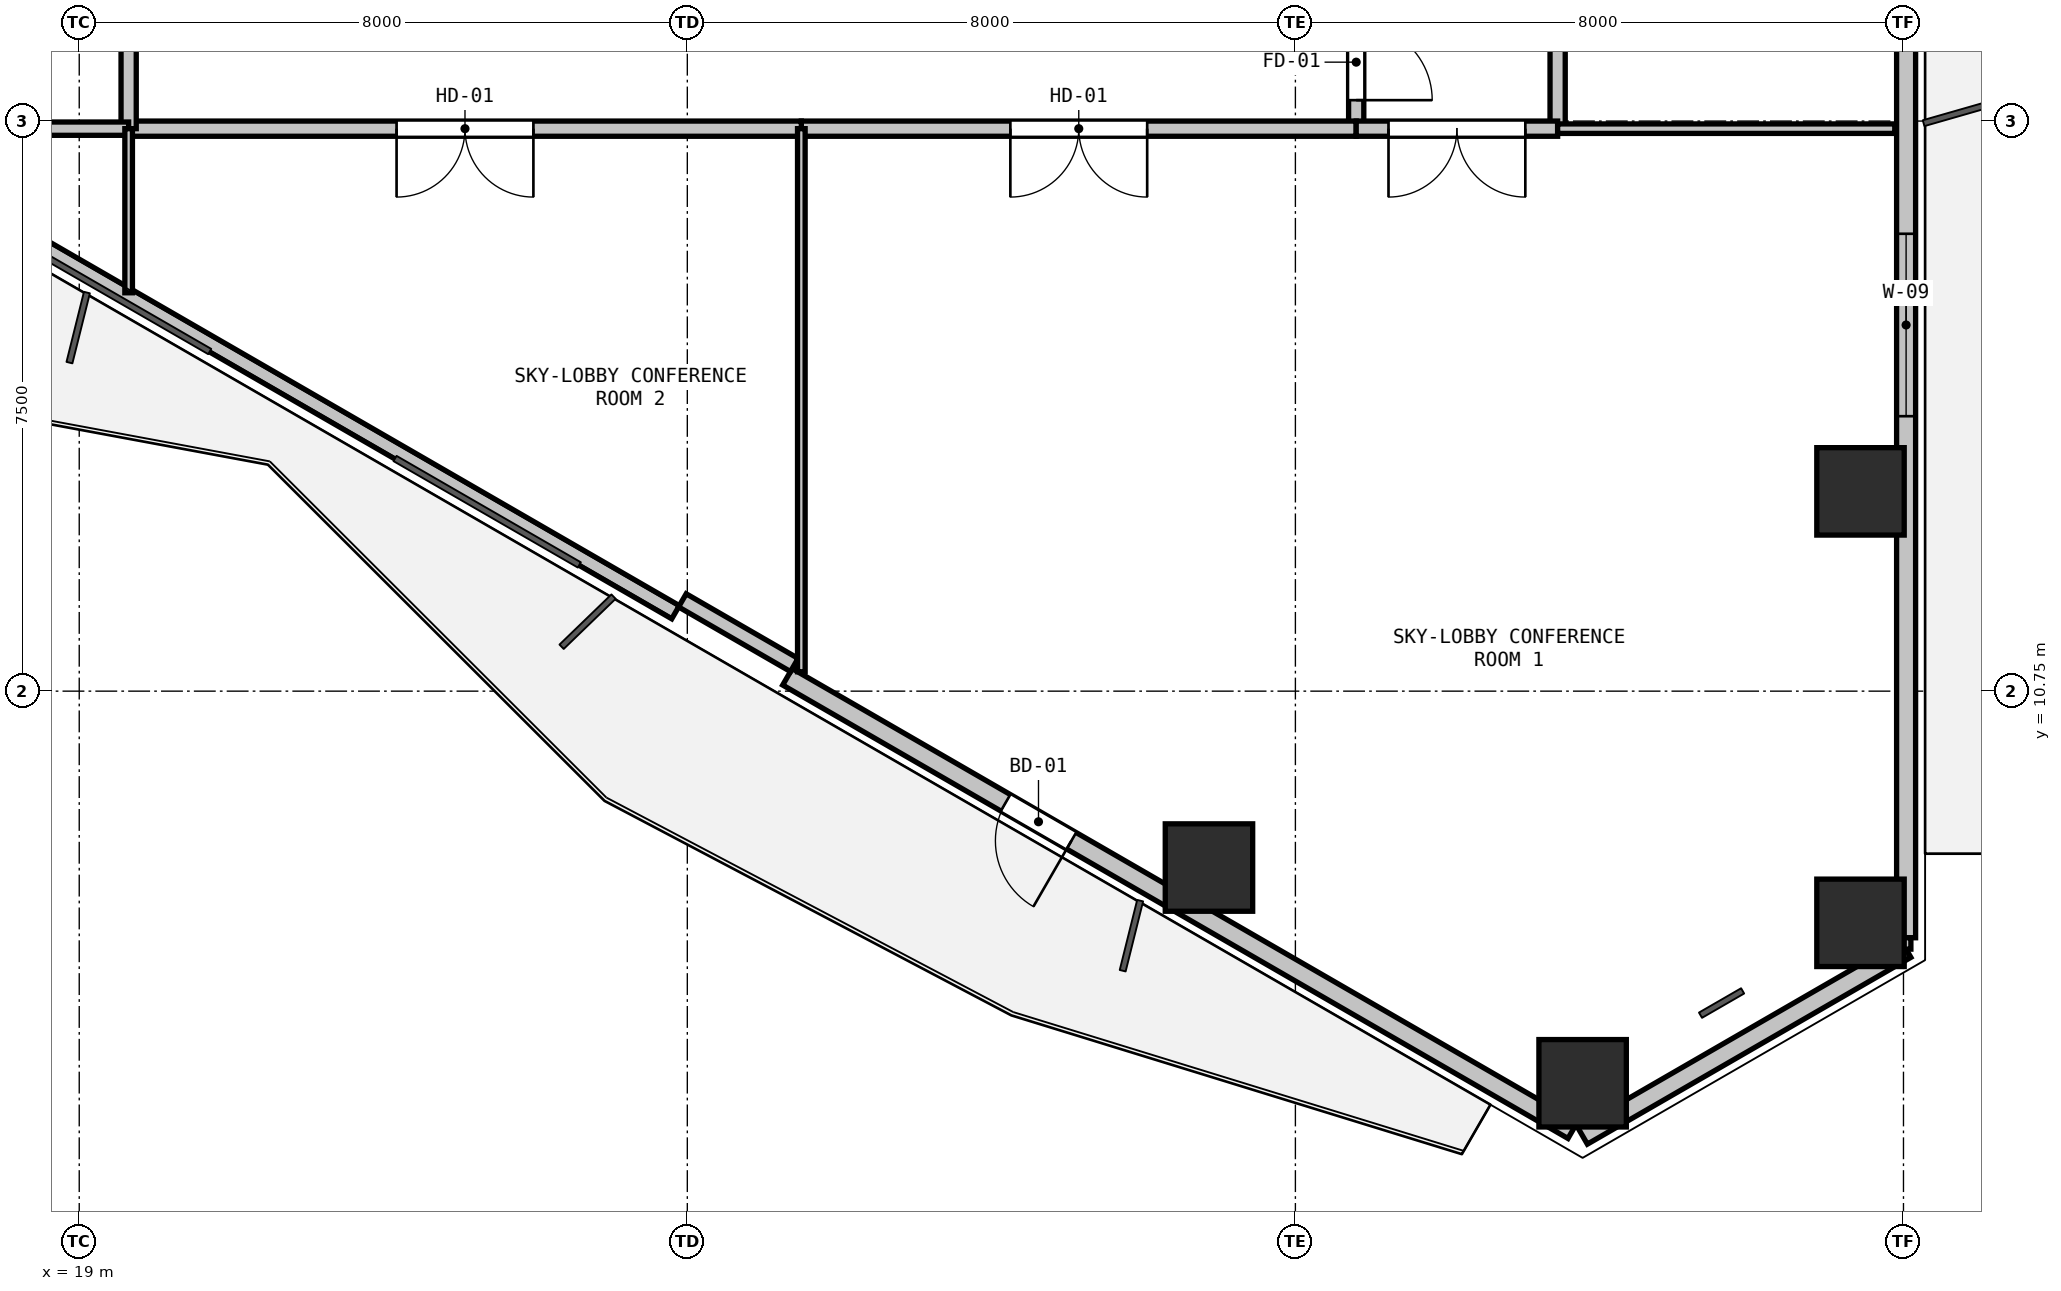
"""IFC4 building model, lengths in metres.
Left out: names, types, materials, properties, quantities, classifications, styles, units other than length and angle.
Written with IfcOpenShell. Run it as: python <this file> out.ifc"""

import sys

from ifc_helpers import new_model, si_unit, direction, frame, frame_2d, origin, origin_2d, place, context, subcontext, project, spatial, rectangle, hollow_rectangle, extrude, element, fill, save


model = new_model("IFC4")
c1 = context("Model", 3, precision=1e-05, world=origin(), true_north=direction((0.0, 1.0)))
c2 = subcontext(c1, "Body", "Model", "MODEL_VIEW")
j1 = project(units=[si_unit("LENGTHUNIT", "METRE"), si_unit("PLANEANGLEUNIT", "RADIAN")], contexts=[c1])
p1 = place(None, origin())
s1 = spatial("IfcSite", under=j1, at=p1, CompositionType="ELEMENT")
p2 = place(p1, origin())
s2 = spatial("IfcBuilding", under=s1, at=p2, CompositionType="ELEMENT")
p3 = place(p2, frame((0.0, 0.0, 116.4)))
s3 = spatial("IfcBuildingStorey", under=s2, at=p3, CompositionType="ELEMENT", Elevation=116.4)
p4 = place(p3, frame((42.435, 13.378, 0.0), z_axis=(0.0, 0.0, 1.0), x_axis=(1.0, 0.0, 0.0)))
e1 = element("IfcColumn", 1, at=p4, inside=s3, PredefinedType="COLUMN", context=c2, shape_type="SweptSolid", body=[
    extrude(hollow_rectangle(XDim=1.15, YDim=1.15, WallThickness=0.032, at=origin_2d()), origin(), (0.0, 0.0, 1.0), 3.21),
])
for number, where, z_axis, x_axis in (
    (2, (42.435, 7.702, 0.0), (0.0, 0.0, 1.0), (1.0, 0.0, 0.0)),
    (3, (38.779, 5.591, 0.0), (0.0, 0.0, 1.0), (1.0, 0.0, 0.0)),
):
    element("IfcColumn", number, at=place(p3, frame(where, z_axis=z_axis, x_axis=x_axis)), inside=s3, PredefinedType="COLUMN", context=c2, shape_type="SweptSolid", body=[
        extrude(hollow_rectangle(XDim=1.15, YDim=1.15, WallThickness=0.032, at=origin_2d()), origin(), (0.0, 0.0, 1.0), 2.96),
    ])
p5 = place(p3, frame((33.863, 8.429, 0.0), z_axis=(0.0, 0.0, 1.0), x_axis=(1.0, 0.0, 0.0)))
e4 = element("IfcColumn", 4, at=p5, inside=s3, PredefinedType="COLUMN", context=c2, shape_type="SweptSolid", body=[
    extrude(hollow_rectangle(XDim=1.15, YDim=1.15, WallThickness=0.032, at=origin_2d()), origin(), (0.0, 0.0, 1.0), 3.21),
])
p6 = place(p3, frame((43.035, 7.356, 0.0), z_axis=(0.0, 0.0, 1.0), x_axis=(-0.866011848704, -0.500023477353, 0.0)))
e5 = element("IfcWall", 5, at=p6, inside=s3, PredefinedType="SOLIDWALL", context=c2, shape_type="SweptSolid", body=[
    extrude(rectangle(XDim=4.914, YDim=0.25, at=frame_2d((2.457, 0.0))), origin(), (0.0, 0.0, 1.0), 4.18),
])
p7 = place(p3, frame((43.035, 19.435, 0.0), z_axis=(0.0, 0.0, 1.0), x_axis=(0.0, -1.0, 0.0)))
e6 = element("IfcWall", 6, at=p7, inside=s3, PredefinedType="SOLIDWALL", context=c2, shape_type="SweptSolid", body=[
    extrude(rectangle(XDim=11.93, YDim=0.25, at=frame_2d((5.965, 0.0))), origin(), (0.0, 0.0, 1.0), 2.945),
])
p8 = place(p7, frame((2.668, 0.0, 0.9)))
e7 = element("IfcOpeningElement", 7, at=p8, cuts=e6, PredefinedType="OPENING", context=c2, shape_type="SweptSolid", body=[
    extrude(rectangle(XDim=2.4, YDim=1.96, at=frame_2d((1.2, 0.98))), frame((0.0, 0.135, 0.0), z_axis=(0.0, -1.0, 0.0), x_axis=(1.0, 0.0, 0.0)), (0.0, 0.0, 1.0), 0.27),
])
p9 = place(p3, frame((38.649, 4.973, 0.0), z_axis=(0.0, 0.0, 1.0), x_axis=(-0.866023023012, 0.500004123596, 0.0)))
e8 = element("IfcWall", 8, at=p9, inside=s3, PredefinedType="SOLIDWALL", context=c2, shape_type="SweptSolid", body=[
    extrude(rectangle(XDim=11.93, YDim=0.25, at=frame_2d((5.965, 0.0))), origin(), (0.0, 0.0, 1.0), 2.945),
])
p10 = place(p9, frame((7.616, 0.0, 0.0)))
e9 = element("IfcOpeningElement", 9, at=p10, cuts=e8, PredefinedType="OPENING", context=c2, shape_type="SweptSolid", body=[
    extrude(rectangle(XDim=1.0, YDim=2.1, at=frame_2d((0.5, 1.05))), frame((0.0, 0.135, 0.0), z_axis=(0.0, -1.0, 0.0), x_axis=(1.0, 0.0, 0.0)), (0.0, 0.0, 1.0), 0.27),
])
p11 = place(p3, frame((26.845, 11.788, 0.0), z_axis=(0.0, 0.0, 1.0), x_axis=(-0.866027010039, 0.499997217876, 0.0)))
e10 = element("IfcWall", 10, at=p11, inside=s3, PredefinedType="PARAPET", context=c2, shape_type="SweptSolid", body=[
    extrude(rectangle(XDim=11.229, YDim=0.2, at=frame_2d((5.615, 0.0))), origin(), (0.0, 0.0, 1.0), 0.2),
])
p12 = place(p3, frame((28.407, 11.094, 0.0), z_axis=(0.0, 0.0, 1.0), x_axis=(-0.86605165483, 0.499954529098, 0.0)))
e11 = element("IfcWall", 11, at=p12, inside=s3, PredefinedType="PARAPET", context=c2, shape_type="SweptSolid", body=[
    extrude(rectangle(XDim=1.7, YDim=0.2, at=frame_2d((0.85, 0.0))), origin(), (0.0, 0.0, 1.0), 4.18),
])
p13 = place(p3, frame((35.8, 19.9, 0.0), z_axis=(0.0, 0.0, 1.0), x_axis=(0.0, -1.0, 0.0)))
e12 = element("IfcWall", 12, at=p13, inside=s3, PredefinedType="PARTITIONING", context=c2, shape_type="SweptSolid", body=[
    extrude(rectangle(XDim=1.75, YDim=0.2, at=frame_2d((0.875, 0.0))), origin(), (0.0, 0.0, 1.0), 3.195),
])
p14 = place(p13, frame((0.375, 0.0, 0.0)))
e13 = element("IfcOpeningElement", 13, at=p14, cuts=e12, PredefinedType="OPENING", context=c2, shape_type="SweptSolid", body=[
    extrude(rectangle(XDim=1.0, YDim=2.15, at=frame_2d((0.5, 1.075))), frame((0.0, 0.11, 0.0), z_axis=(0.0, -1.0, 0.0), x_axis=(1.0, 0.0, 0.0)), (0.0, 0.0, 1.0), 0.22),
])
p15 = place(p3, frame((35.8, 18.15, 0.0), z_axis=(0.0, 0.0, 1.0), x_axis=(-1.0, 0.0, 0.0)))
e14 = element("IfcWall", 14, at=p15, inside=s3, PredefinedType="PARTITIONING", context=c2, shape_type="SweptSolid", body=[
    extrude(rectangle(XDim=7.3, YDim=0.2, at=frame_2d((3.65, 0.0))), origin(), (0.0, 0.0, 1.0), 2.945),
])
p16 = place(p15, frame((2.75, 0.0, 0.0)))
e15 = element("IfcOpeningElement", 15, at=p16, cuts=e14, PredefinedType="OPENING", context=c2, shape_type="SweptSolid", body=[
    extrude(rectangle(XDim=1.8, YDim=2.2, at=frame_2d((0.9, 1.1))), frame((0.0, 0.11, 0.0), z_axis=(0.0, -1.0, 0.0), x_axis=(1.0, 0.0, 0.0)), (0.0, 0.0, 1.0), 0.22),
])
p17 = place(p3, frame((28.5, 18.15, 0.0), z_axis=(0.0, 0.0, 1.0), x_axis=(-1.0, 0.0, 0.0)))
e16 = element("IfcWall", 16, at=p17, inside=s3, PredefinedType="PARTITIONING", context=c2, shape_type="SweptSolid", body=[
    extrude(rectangle(XDim=8.85, YDim=0.2, at=frame_2d((4.425, 0.0))), origin(), (0.0, 0.0, 1.0), 4.56),
])
p18 = place(p17, frame((3.525, 0.0, 0.0)))
e17 = element("IfcOpeningElement", 17, at=p18, cuts=e16, PredefinedType="OPENING", context=c2, shape_type="SweptSolid", body=[
    extrude(rectangle(XDim=1.8, YDim=2.2, at=frame_2d((0.9, 1.1))), frame((0.0, 0.11, 0.0), z_axis=(0.0, -1.0, 0.0), x_axis=(1.0, 0.0, 0.0)), (0.0, 0.0, 1.0), 0.22),
])
p19 = place(p3, frame((19.65, 18.15, 0.0), z_axis=(0.0, 0.0, 1.0), x_axis=(0.0, 1.0, 0.0)))
e18 = element("IfcWall", 18, at=p19, inside=s3, PredefinedType="PARTITIONING", context=c2, shape_type="SweptSolid", body=[
    extrude(rectangle(XDim=6.05, YDim=0.2, at=frame_2d((3.025, 0.0))), origin(), (0.0, 0.0, 1.0), 2.945),
])
p20 = place(p19, frame((2.6, 0.0, 0.0)))
e19 = element("IfcOpeningElement", 19, at=p20, cuts=e18, PredefinedType="OPENING", context=c2, shape_type="SweptSolid", body=[
    extrude(rectangle(XDim=0.85, YDim=2.1, at=frame_2d((0.425, 1.05))), frame((0.0, 0.11, 0.0), z_axis=(0.0, -1.0, 0.0), x_axis=(1.0, 0.0, 0.0)), (0.0, 0.0, 1.0), 0.22),
])
p21 = place(p3, frame((38.45, 35.35, 0.0), z_axis=(0.0, 0.0, 1.0), x_axis=(0.0, -1.0, 0.0)))
e20 = element("IfcWall", 20, at=p21, inside=s3, PredefinedType="PARTITIONING", context=c2, shape_type="SweptSolid", body=[
    extrude(rectangle(XDim=17.2, YDim=0.2, at=frame_2d((8.6, 0.0))), origin(), (0.0, 0.0, 1.0), 3.195),
])
p22 = place(p21, frame((8.1, 0.0, 0.0)))
e21 = element("IfcOpeningElement", 21, at=p22, cuts=e20, PredefinedType="OPENING", context=c2, shape_type="SweptSolid", body=[
    extrude(rectangle(XDim=1.0, YDim=2.15, at=frame_2d((0.5, 1.075))), frame((0.0, 0.11, 0.0), z_axis=(0.0, -1.0, 0.0), x_axis=(1.0, 0.0, 0.0)), (0.0, 0.0, 1.0), 0.22),
])
p23 = place(p3, frame((38.45, 18.15, 0.0), z_axis=(0.0, 0.0, 1.0), x_axis=(-1.0, 0.0, 0.0)))
e22 = element("IfcWall", 22, at=p23, inside=s3, PredefinedType="PARTITIONING", context=c2, shape_type="SweptSolid", body=[
    extrude(rectangle(XDim=2.65, YDim=0.2, at=frame_2d((1.325, 0.0))), origin(), (0.0, 0.0, 1.0), 3.195),
])
p24 = place(p23, frame((0.425, 0.0, 0.0)))
e23 = element("IfcOpeningElement", 23, at=p24, cuts=e22, PredefinedType="OPENING", context=c2, shape_type="SweptSolid", body=[
    extrude(rectangle(XDim=1.8, YDim=2.2, at=frame_2d((0.9, 1.1))), frame((0.0, 0.11, 0.0), z_axis=(0.0, -1.0, 0.0), x_axis=(1.0, 0.0, 0.0)), (0.0, 0.0, 1.0), 0.22),
])
p25 = place(p3, frame((19.65, 18.15, 0.0), z_axis=(0.0, 0.0, 1.0), x_axis=(-1.0, 0.0, 0.0)))
e24 = element("IfcWall", 24, at=p25, inside=s3, PredefinedType="PLUMBINGWALL", context=c2, shape_type="SweptSolid", body=[
    extrude(rectangle(XDim=3.238, YDim=0.175, at=frame_2d((1.619, 0.0))), origin(), (0.0, 0.0, 1.0), 2.365),
])
p26 = place(p3, frame((42.885, 18.15, 0.0), z_axis=(0.0, 0.0, 1.0), x_axis=(-1.0, 0.0, 0.0)))
e25 = element("IfcWall", 25, at=p26, inside=s3, PredefinedType="PARTITIONING", context=c2, shape_type="SweptSolid", body=[
    extrude(rectangle(XDim=4.436, YDim=0.125, at=frame_2d((2.218, 0.0))), origin(), (0.0, 0.0, 1.0), 2.365),
])
p27 = place(p3, frame((28.5, 11.005, 0.0), z_axis=(0.0, 0.0, 1.0), x_axis=(0.0, 1.0, 0.0)))
e26 = element("IfcWall", 26, at=p27, inside=s3, PredefinedType="PARTITIONING", context=c2, shape_type="SweptSolid", body=[
    extrude(rectangle(XDim=7.145, YDim=0.1, at=frame_2d((3.573, 0.0))), origin(), (0.0, 0.0, 1.0), 2.365),
])
p28 = place(p3, frame((43.035, 7.506, 0.0), z_axis=(0.0, 0.0, 1.0), x_axis=(0.0, -1.0, 0.0)))
e27 = element("IfcWall", 27, at=p28, inside=s3, PredefinedType="PARTITIONING", context=c2, shape_type="SweptSolid", body=[
    extrude(rectangle(XDim=0.15, YDim=0.125, at=frame_2d((0.075, 0.0))), origin(), (0.0, 0.0, 1.0), 4.56),
])
p29 = place(p3, frame((19.65, 15.991, 0.0), z_axis=(0.0, 0.0, 1.0), x_axis=(0.0, 1.0, 0.0)))
e28 = element("IfcWall", 28, at=p29, inside=s3, PredefinedType="PARTITIONING", context=c2, shape_type="SweptSolid", body=[
    extrude(rectangle(XDim=2.159, YDim=0.1, at=frame_2d((1.08, 0.0))), origin(), (0.0, 0.0, 1.0), 2.365),
])
p30 = place(p8, origin())
e29 = element("IfcWindow", 29, at=p30, inside=s3, PartitioningType="SINGLE_PANEL", PredefinedType="WINDOW", context=c2, shape_type="SweptSolid", body=[
    extrude(rectangle(XDim=2.4, YDim=1.96, at=frame_2d((1.2, 0.98))), frame((0.0, 0.03, 0.0), z_axis=(0.0, -1.0, 0.0), x_axis=(1.0, 0.0, 0.0)), (0.0, 0.0, 1.0), 0.06),
])
fill(e7, e29)
p31 = place(p10, origin())
e30 = element("IfcDoor", 30, at=p31, inside=s3, OperationType="SINGLE_SWING_LEFT", PredefinedType="DOOR", context=c2, shape_type="SweptSolid", body=[
    extrude(rectangle(XDim=1.0, YDim=2.1, at=frame_2d((0.5, 1.05))), frame((0.0, 0.025, 0.0), z_axis=(0.0, -1.0, 0.0), x_axis=(1.0, 0.0, 0.0)), (0.0, 0.0, 1.0), 0.05),
])
fill(e9, e30)
p32 = place(p14, origin())
e31 = element("IfcDoor", 31, at=p32, inside=s3, OperationType="SINGLE_SWING_RIGHT", PredefinedType="DOOR", context=c2, shape_type="SweptSolid", body=[
    extrude(rectangle(XDim=1.0, YDim=2.15, at=frame_2d((0.5, 1.075))), frame((0.0, 0.025, 0.0), z_axis=(0.0, -1.0, 0.0), x_axis=(1.0, 0.0, 0.0)), (0.0, 0.0, 1.0), 0.05),
])
fill(e13, e31)
p33 = place(p16, origin())
e32 = element("IfcDoor", 32, at=p33, inside=s3, OperationType="DOUBLE_DOOR_SINGLE_SWING", PredefinedType="DOOR", context=c2, shape_type="SweptSolid", body=[
    extrude(rectangle(XDim=1.8, YDim=2.2, at=frame_2d((0.9, 1.1))), frame((0.0, 0.025, 0.0), z_axis=(0.0, -1.0, 0.0), x_axis=(1.0, 0.0, 0.0)), (0.0, 0.0, 1.0), 0.05),
])
fill(e15, e32)
p34 = place(p18, origin())
e33 = element("IfcDoor", 33, at=p34, inside=s3, OperationType="DOUBLE_DOOR_SINGLE_SWING", PredefinedType="DOOR", context=c2, shape_type="SweptSolid", body=[
    extrude(rectangle(XDim=1.8, YDim=2.2, at=frame_2d((0.9, 1.1))), frame((0.0, 0.025, 0.0), z_axis=(0.0, -1.0, 0.0), x_axis=(1.0, 0.0, 0.0)), (0.0, 0.0, 1.0), 0.05),
])
fill(e17, e33)
p35 = place(p24, origin())
e34 = element("IfcDoor", 34, at=p35, inside=s3, OperationType="DOUBLE_DOOR_SINGLE_SWING", PredefinedType="DOOR", context=c2, shape_type="SweptSolid", body=[
    extrude(rectangle(XDim=1.8, YDim=2.2, at=frame_2d((0.9, 1.1))), frame((0.0, 0.025, 0.0), z_axis=(0.0, -1.0, 0.0), x_axis=(1.0, 0.0, 0.0)), (0.0, 0.0, 1.0), 0.05),
])
fill(e23, e34)
save(model, sys.argv[1])
